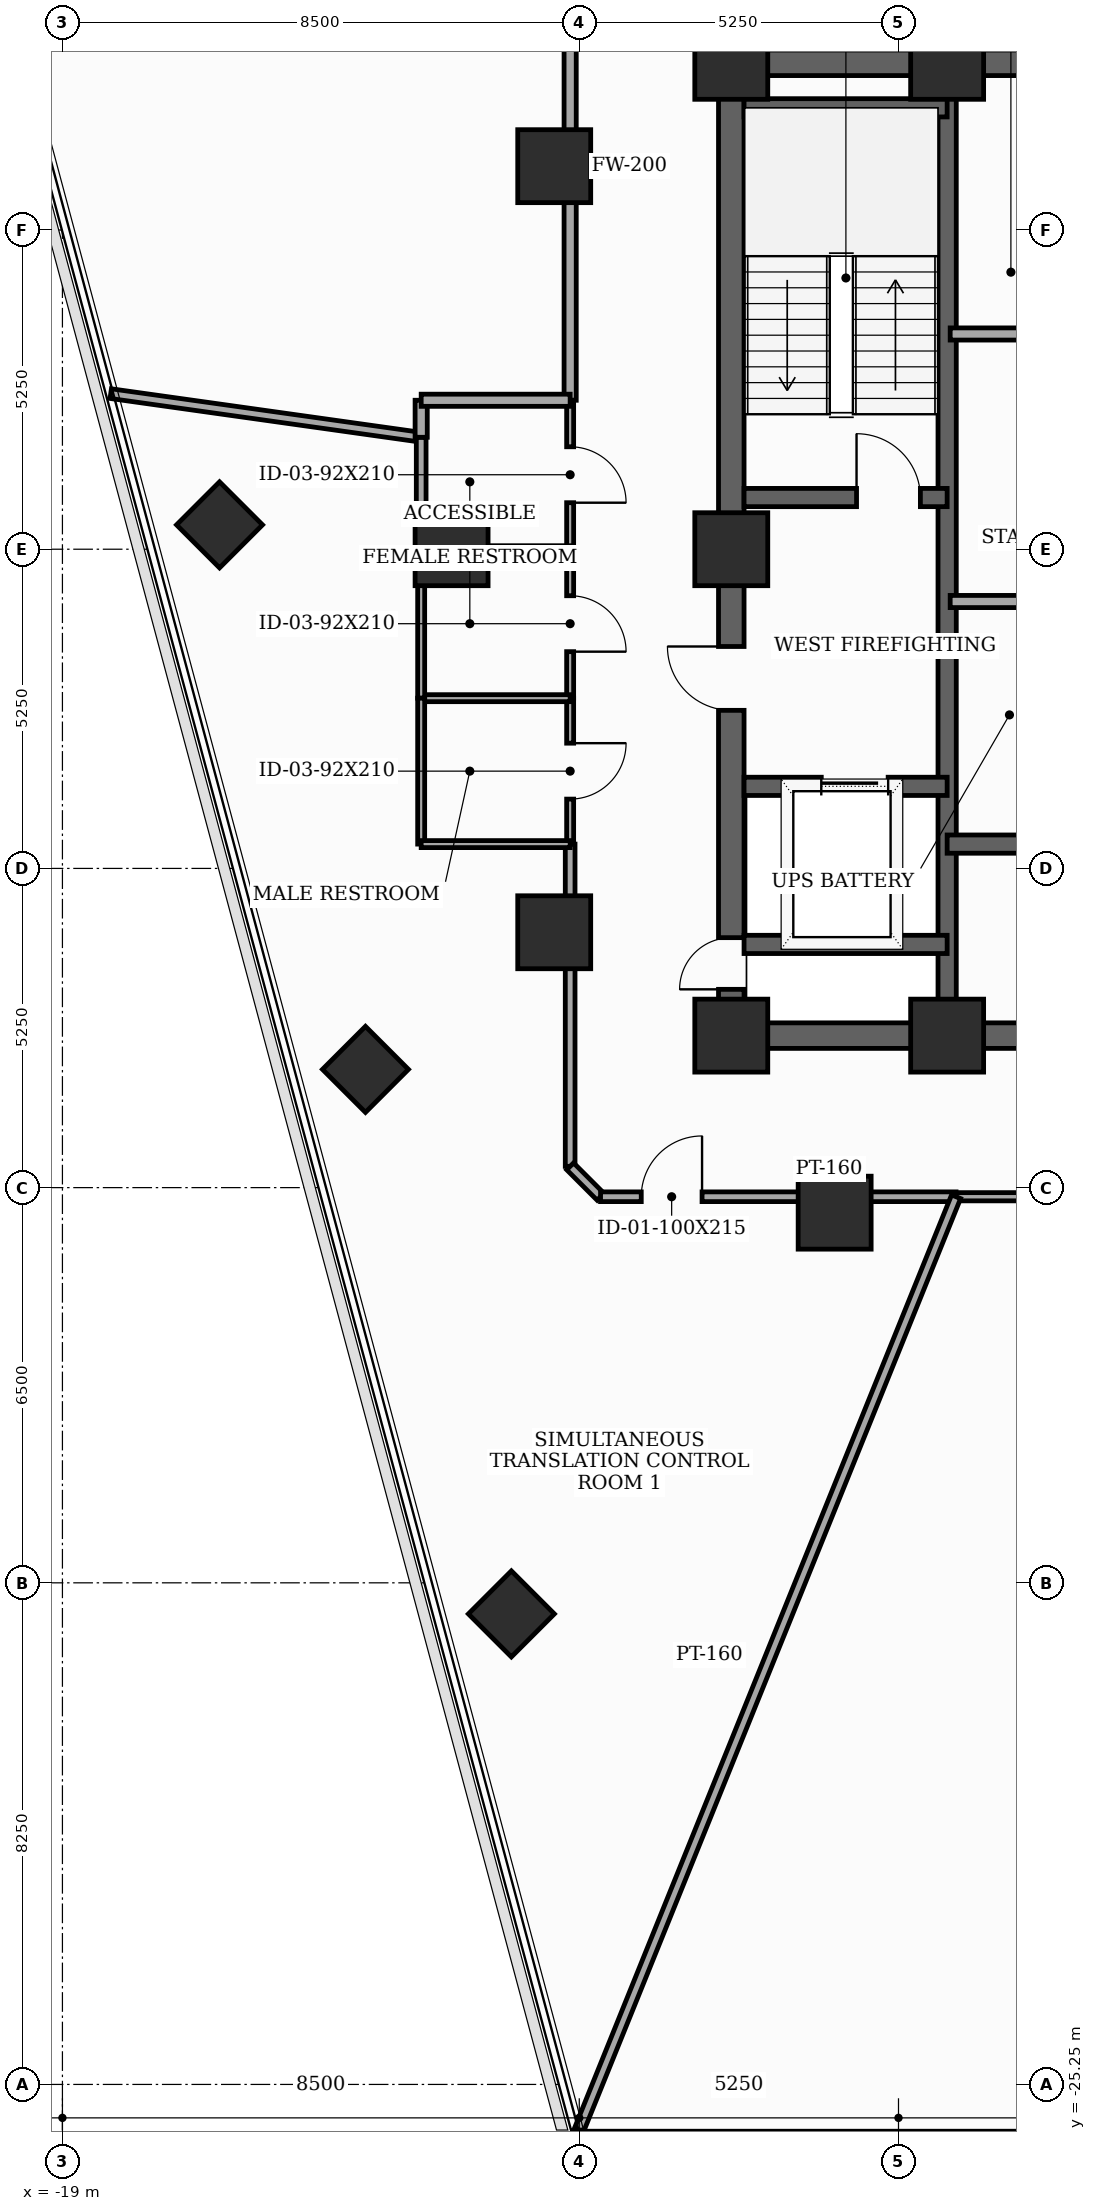
"""IFC4 building model, lengths in metres.
Left out: names, types, materials, properties, quantities, classifications, styles, units other than length and angle.
Written with IfcOpenShell. Run it as: python <this file> out.ifc"""

import sys

from ifc_helpers import new_model, si_unit, direction, frame, frame_2d, origin, origin_2d, place, context, subcontext, project, spatial, rectangle, extrude, element, fill, save


model = new_model("IFC4")
c1 = context("Model", 3, precision=1e-05, world=origin(), true_north=direction((0.0, 1.0)))
c2 = subcontext(c1, "Body", "Model", "MODEL_VIEW")
j1 = project(units=[si_unit("LENGTHUNIT", "METRE"), si_unit("PLANEANGLEUNIT", "RADIAN")], contexts=[c1])
p1 = place(None, origin())
s1 = spatial("IfcSite", under=j1, at=p1, CompositionType="ELEMENT")
p2 = place(p1, origin())
s2 = spatial("IfcBuilding", under=s1, at=p2, CompositionType="ELEMENT")
p3 = place(p2, frame((0.0, 0.0, 195.3)))
s3 = spatial("IfcBuildingStorey", under=s2, at=p3, CompositionType="ELEMENT", Elevation=195.3)
for number, where, z_axis, x_axis in (
    (1, (-8.0, -8.0, 0.0), (0.0, 0.0, 1.0), (1.0, 0.0, 0.0)),
    (2, (-4.45, -8.0, 0.0), (0.0, 0.0, 1.0), (1.0, 0.0, 0.0)),
    (3, (-4.45, 8.0, 0.0), (0.0, 0.0, 1.0), (1.0, 0.0, 0.0)),
    (4, (-8.0, 8.0, 0.0), (0.0, 0.0, 1.0), (1.0, 0.0, 0.0)),
    (5, (-8.0, 0.0, 0.0), (0.0, 0.0, 1.0), (1.0, 0.0, 0.0)),
    (6, (-10.912, 6.3, 0.0), (0.0, 0.0, 1.0), (1.0, 0.0, 0.0)),
    (7, (-12.6, 0.0, 0.0), (0.0, 0.0, 1.0), (1.0, 0.0, 0.0)),
    (8, (-10.912, -6.3, 0.0), (0.0, 0.0, 1.0), (1.0, 0.0, 0.0)),
    (9, (-6.3, -10.912, 0.0), (0.0, 0.0, 1.0), (1.0, 0.0, 0.0)),
):
    element("IfcColumn", number, at=place(p3, frame(where, z_axis=z_axis, x_axis=x_axis)), inside=s3, PredefinedType="COLUMN", context=c2, shape_type="SweptSolid", body=[
        extrude(rectangle(XDim=1.2, YDim=1.2, at=origin_2d()), origin(), (0.0, 0.0, 1.0), 3.7),
    ])
for number, where, z_axis, x_axis in (
    (10, (-16.416, 0.401, 0.0), (0.0, 0.0, 1.0), (0.707, 0.707, 0.0)),
    (11, (-14.016, -8.555, 0.0), (0.0, 0.0, 1.0), (0.707, 0.707, 0.0)),
    (12, (-11.616, -17.511, 0.0), (0.0, 0.0, 1.0), (0.707, 0.707, 0.0)),
):
    element("IfcColumn", number, at=place(p3, frame(where, z_axis=z_axis, x_axis=x_axis)), inside=s3, PredefinedType="COLUMN", context=c2, shape_type="SweptSolid", body=[
        extrude(rectangle(XDim=1.0, YDim=1.0, at=origin_2d()), origin(), (0.0, 0.0, 1.0), 3.7),
    ])
p4 = place(p3, frame((-8.0, -8.0, 0.0), z_axis=(0.0, 0.0, 1.0), x_axis=(0.0, 1.0, 0.0)))
e13 = element("IfcWall", 13, at=p4, inside=s3, PredefinedType="SHEAR", context=c2, shape_type="SweptSolid", body=[
    extrude(rectangle(XDim=16.0, YDim=0.42, at=frame_2d((8.0, 0.0))), origin(), (0.0, 0.0, 1.0), 3.5),
])
p5 = place(p4, frame((0.761, 0.0, 0.0)))
e14 = element("IfcOpeningElement", 14, at=p5, cuts=e13, PredefinedType="OPENING", context=c2, shape_type="SweptSolid", body=[
    extrude(rectangle(XDim=0.85, YDim=2.02, at=frame_2d((0.425, 1.01))), frame((0.0, 0.22, 0.0), z_axis=(0.0, -1.0, 0.0), x_axis=(1.0, 0.0, 0.0)), (0.0, 0.0, 1.0), 0.44),
])
p6 = place(p4, frame((5.35, 0.0, 0.0)))
e15 = element("IfcOpeningElement", 15, at=p6, cuts=e13, PredefinedType="OPENING", context=c2, shape_type="SweptSolid", body=[
    extrude(rectangle(XDim=1.05, YDim=2.15, at=frame_2d((0.525, 1.075))), frame((0.0, 0.22, 0.0), z_axis=(0.0, -1.0, 0.0), x_axis=(1.0, 0.0, 0.0)), (0.0, 0.0, 1.0), 0.44),
])
p7 = place(p3, frame((-8.0, -8.0, 0.0), z_axis=(0.0, 0.0, 1.0), x_axis=(1.0, 0.0, 0.0)))
e16 = element("IfcWall", 16, at=p7, inside=s3, PredefinedType="SHEAR", context=c2, shape_type="SweptSolid", body=[
    extrude(rectangle(XDim=16.0, YDim=0.42, at=frame_2d((8.0, 0.0))), origin(), (0.0, 0.0, 1.0), 3.5),
])
p8 = place(p7, frame((5.2, 0.0, 0.0)))
e17 = element("IfcOpeningElement", 17, at=p8, cuts=e16, PredefinedType="OPENING", context=c2, shape_type="SweptSolid", body=[
    extrude(rectangle(XDim=0.95, YDim=2.1, at=frame_2d((0.475, 1.05))), frame((0.0, 0.22, 0.0), z_axis=(0.0, -1.0, 0.0), x_axis=(1.0, 0.0, 0.0)), (0.0, 0.0, 1.0), 0.44),
])
p9 = place(p7, frame((9.8, 0.0, 0.0)))
e18 = element("IfcOpeningElement", 18, at=p9, cuts=e16, PredefinedType="OPENING", context=c2, shape_type="SweptSolid", body=[
    extrude(rectangle(XDim=0.95, YDim=2.1, at=frame_2d((0.475, 1.05))), frame((0.0, 0.22, 0.0), z_axis=(0.0, -1.0, 0.0), x_axis=(1.0, 0.0, 0.0)), (0.0, 0.0, 1.0), 0.44),
])
p10 = place(p3, frame((-8.0, 8.0, 0.0), z_axis=(0.0, 0.0, 1.0), x_axis=(1.0, 0.0, 0.0)))
e19 = element("IfcWall", 19, at=p10, inside=s3, PredefinedType="SHEAR", context=c2, shape_type="SweptSolid", body=[
    extrude(rectangle(XDim=16.0, YDim=0.42, at=frame_2d((8.0, 0.0))), origin(), (0.0, 0.0, 1.0), 3.5),
])
p11 = place(p10, frame((7.1, 0.0, 0.0)))
e20 = element("IfcOpeningElement", 20, at=p11, cuts=e19, PredefinedType="OPENING", context=c2, shape_type="SweptSolid", body=[
    extrude(rectangle(XDim=1.8, YDim=2.15, at=frame_2d((0.9, 1.075))), frame((0.0, 0.22, 0.0), z_axis=(0.0, -1.0, 0.0), x_axis=(1.0, 0.0, 0.0)), (0.0, 0.0, 1.0), 0.44),
])
p12 = place(p3, frame((-4.45, -7.79, 0.0), z_axis=(0.0, 0.0, 1.0), x_axis=(0.0, 1.0, 0.0)))
e21 = element("IfcWall", 21, at=p12, inside=s3, PredefinedType="SHEAR", context=c2, shape_type="SweptSolid", body=[
    extrude(rectangle(XDim=15.58, YDim=0.3, at=frame_2d((7.79, 0.0))), origin(), (0.0, 0.0, 1.0), 3.5),
])
p13 = place(p3, frame((-7.79, 0.85, 0.0), z_axis=(0.0, 0.0, 1.0), x_axis=(1.0, 0.0, 0.0)))
e22 = element("IfcWall", 22, at=p13, inside=s3, PredefinedType="SHEAR", context=c2, shape_type="SweptSolid", body=[
    extrude(rectangle(XDim=3.34, YDim=0.3, at=frame_2d((1.67, 0.0))), origin(), (0.0, 0.0, 1.0), 3.5),
])
p14 = place(p13, frame((1.85, 0.0, 0.0)))
e23 = element("IfcOpeningElement", 23, at=p14, cuts=e22, PredefinedType="OPENING", context=c2, shape_type="SweptSolid", body=[
    extrude(rectangle(XDim=1.05, YDim=2.15, at=frame_2d((0.525, 1.075))), frame((0.0, 0.16, 0.0), z_axis=(0.0, -1.0, 0.0), x_axis=(1.0, 0.0, 0.0)), (0.0, 0.0, 1.0), 0.32),
])
p15 = place(p3, frame((-7.79, 7.26, 0.0), z_axis=(0.0, 0.0, 1.0), x_axis=(1.0, 0.0, 0.0)))
e24 = element("IfcWall", 24, at=p15, inside=s3, PredefinedType="SHEAR", context=c2, shape_type="SweptSolid", body=[
    extrude(rectangle(XDim=3.34, YDim=0.3, at=frame_2d((1.67, 0.0))), origin(), (0.0, 0.0, 1.0), 3.5),
])
p16 = place(p3, frame((-7.79, -3.9, 0.0), z_axis=(0.0, 0.0, 1.0), x_axis=(1.0, 0.0, 0.0)))
e25 = element("IfcWall", 25, at=p16, inside=s3, PredefinedType="SHEAR", context=c2, shape_type="SweptSolid", body=[
    extrude(rectangle(XDim=3.34, YDim=0.3, at=frame_2d((1.67, 0.0))), origin(), (0.0, 0.0, 1.0), 3.5),
])
p17 = place(p16, frame((1.27, 0.0, 0.0)))
e26 = element("IfcOpeningElement", 26, at=p17, cuts=e25, PredefinedType="OPENING", context=c2, shape_type="SweptSolid", body=[
    extrude(rectangle(XDim=1.1, YDim=2.1, at=frame_2d((0.55, 1.05))), frame((0.0, 0.16, 0.0), z_axis=(0.0, -1.0, 0.0), x_axis=(1.0, 0.0, 0.0)), (0.0, 0.0, 1.0), 0.32),
])
p18 = place(p3, frame((-7.79, -6.5, 0.0), z_axis=(0.0, 0.0, 1.0), x_axis=(1.0, 0.0, 0.0)))
e27 = element("IfcWall", 27, at=p18, inside=s3, PredefinedType="SHEAR", context=c2, shape_type="SweptSolid", body=[
    extrude(rectangle(XDim=3.34, YDim=0.3, at=frame_2d((1.67, 0.0))), origin(), (0.0, 0.0, 1.0), 3.5),
])
p19 = place(p3, frame((-4.45, -4.85, 0.0), z_axis=(0.0, 0.0, 1.0), x_axis=(1.0, 0.0, 0.0)))
e28 = element("IfcWall", 28, at=p19, inside=s3, PredefinedType="SHEAR", context=c2, shape_type="SweptSolid", body=[
    extrude(rectangle(XDim=8.9, YDim=0.3, at=frame_2d((4.45, 0.0))), origin(), (0.0, 0.0, 1.0), 3.5),
])
for number, where, z_axis, x_axis in (
    (29, (-4.4, -0.86, 0.0), (0.0, 0.0, 1.0), (1.0, 0.0, 0.0)),
    (30, (-4.4, 3.54, 0.0), (0.0, 0.0, 1.0), (1.0, 0.0, 0.0)),
):
    element("IfcWall", number, at=place(p3, frame(where, z_axis=z_axis, x_axis=x_axis)), inside=s3, PredefinedType="SOLIDWALL", context=c2, shape_type="SweptSolid", body=[
        extrude(rectangle(XDim=2.68, YDim=0.2, at=frame_2d((1.34, 0.0))), origin(), (0.0, 0.0, 1.0), 3.5),
    ])
p20 = place(p3, frame((-10.65, 0.0, 0.0), z_axis=(0.0, 0.0, 1.0), x_axis=(0.0, -1.0, 0.0)))
e31 = element("IfcWall", 31, at=p20, inside=s3, PredefinedType="PARTITIONING", context=c2, shape_type="SweptSolid", body=[
    extrude(rectangle(XDim=2.45, YDim=0.115, at=frame_2d((1.225, 0.0))), origin(), (0.0, 0.0, 1.0), 2.885),
])
p21 = place(p20, frame((0.765, 0.0, 0.0)))
e32 = element("IfcOpeningElement", 32, at=p21, cuts=e31, PredefinedType="OPENING", context=c2, shape_type="SweptSolid", body=[
    extrude(rectangle(XDim=0.92, YDim=2.1, at=frame_2d((0.46, 1.05))), frame((0.0, 0.067, 0.0), z_axis=(0.0, -1.0, 0.0), x_axis=(1.0, 0.0, 0.0)), (0.0, 0.0, 1.0), 0.135),
])
p22 = place(p3, frame((-10.65, -2.45, 0.0), z_axis=(0.0, 0.0, 1.0), x_axis=(0.0, -1.0, 0.0)))
e33 = element("IfcWall", 33, at=p22, inside=s3, PredefinedType="PARTITIONING", context=c2, shape_type="SweptSolid", body=[
    extrude(rectangle(XDim=2.4, YDim=0.115, at=frame_2d((1.2, 0.0))), origin(), (0.0, 0.0, 1.0), 3.5),
])
p23 = place(p22, frame((0.74, 0.0, 0.0)))
e34 = element("IfcOpeningElement", 34, at=p23, cuts=e33, PredefinedType="OPENING", context=c2, shape_type="SweptSolid", body=[
    extrude(rectangle(XDim=0.92, YDim=2.1, at=frame_2d((0.46, 1.05))), frame((0.0, 0.067, 0.0), z_axis=(0.0, -1.0, 0.0), x_axis=(1.0, 0.0, 0.0)), (0.0, 0.0, 1.0), 0.135),
])
p24 = place(p3, frame((-10.65, -4.85, 0.0), z_axis=(0.0, 0.0, 1.0), x_axis=(0.0, -1.0, 0.0)))
e35 = element("IfcWall", 35, at=p24, inside=s3, PredefinedType="PARTITIONING", context=c2, shape_type="SweptSolid", body=[
    extrude(rectangle(XDim=5.3, YDim=0.16, at=frame_2d((2.65, 0.0))), origin(), (0.0, 0.0, 1.0), 2.885),
])
p25 = place(p3, frame((-10.65, -10.15, 0.0), z_axis=(0.0, 0.0, 1.0), x_axis=(0.707106781187, -0.707106781187, 0.0)))
e36 = element("IfcWall", 36, at=p25, inside=s3, PredefinedType="PARTITIONING", context=c2, shape_type="SweptSolid", body=[
    extrude(rectangle(XDim=0.707, YDim=0.16, at=frame_2d((0.354, 0.0))), origin(), (0.0, 0.0, 1.0), 3.5),
])
p26 = place(p3, frame((-10.15, -10.65, 0.0), z_axis=(0.0, 0.0, 1.0), x_axis=(1.0, 0.0, 0.0)))
e37 = element("IfcWall", 37, at=p26, inside=s3, PredefinedType="PARTITIONING", context=c2, shape_type="SweptSolid", body=[
    extrude(rectangle(XDim=5.847, YDim=0.16, at=frame_2d((2.923, 0.0))), origin(), (0.0, 0.0, 1.0), 2.885),
])
p27 = place(p26, frame((0.669, 0.0, 0.0)))
e38 = element("IfcOpeningElement", 38, at=p27, cuts=e37, PredefinedType="OPENING", context=c2, shape_type="SweptSolid", body=[
    extrude(rectangle(XDim=1.0, YDim=2.15, at=frame_2d((0.5, 1.075))), frame((0.0, 0.09, 0.0), z_axis=(0.0, -1.0, 0.0), x_axis=(1.0, 0.0, 0.0)), (0.0, 0.0, 1.0), 0.18),
])
p28 = place(p3, frame((-4.303, -10.65, 0.0), z_axis=(0.0, 0.0, 1.0), x_axis=(1.0, 0.0, 0.0)))
e39 = element("IfcWall", 39, at=p28, inside=s3, PredefinedType="PARTITIONING", context=c2, shape_type="SweptSolid", body=[
    extrude(rectangle(XDim=14.453, YDim=0.135, at=frame_2d((7.227, 0.0))), origin(), (0.0, 0.0, 1.0), 2.885),
])
p29 = place(p28, frame((6.751, 0.0, 0.0)))
e40 = element("IfcOpeningElement", 40, at=p29, cuts=e39, PredefinedType="OPENING", context=c2, shape_type="SweptSolid", body=[
    extrude(rectangle(XDim=0.95, YDim=2.1, at=frame_2d((0.475, 1.05))), frame((0.0, 0.077, 0.0), z_axis=(0.0, -1.0, 0.0), x_axis=(1.0, 0.0, 0.0)), (0.0, 0.0, 1.0), 0.155),
])
p30 = place(p3, frame((-10.65, 10.15, 0.0), z_axis=(0.0, 0.0, 1.0), x_axis=(0.0, -1.0, 0.0)))
e41 = element("IfcWall", 41, at=p30, inside=s3, PredefinedType="SOLIDWALL", context=c2, shape_type="SweptSolid", body=[
    extrude(rectangle(XDim=7.7, YDim=0.2, at=frame_2d((3.85, 0.0))), origin(), (0.0, 0.0, 1.0), 2.885),
])
p31 = place(p3, frame((-10.65, 2.45, 0.0), z_axis=(0.0, 0.0, 1.0), x_axis=(0.0, -1.0, 0.0)))
e42 = element("IfcWall", 42, at=p31, inside=s3, PredefinedType="PARTITIONING", context=c2, shape_type="SweptSolid", body=[
    extrude(rectangle(XDim=2.45, YDim=0.115, at=frame_2d((1.225, 0.0))), origin(), (0.0, 0.0, 1.0), 2.885),
])
p32 = place(p31, frame((0.765, 0.0, 0.0)))
e43 = element("IfcOpeningElement", 43, at=p32, cuts=e42, PredefinedType="OPENING", context=c2, shape_type="SweptSolid", body=[
    extrude(rectangle(XDim=0.92, YDim=2.1, at=frame_2d((0.46, 1.05))), frame((0.0, 0.067, 0.0), z_axis=(0.0, -1.0, 0.0), x_axis=(1.0, 0.0, 0.0)), (0.0, 0.0, 1.0), 0.135),
])
p33 = place(p3, frame((-13.1, -2.45, 0.0), z_axis=(0.0, 0.0, 1.0), x_axis=(1.0, 0.0, 0.0)))
e44 = element("IfcWall", 44, at=p33, inside=s3, PredefinedType="PARTITIONING", context=c2, shape_type="SweptSolid", body=[
    extrude(rectangle(XDim=2.45, YDim=0.115, at=frame_2d((1.225, 0.0))), origin(), (0.0, 0.0, 1.0), 2.885),
])
p34 = place(p3, frame((-13.1, 0.0, 0.0), z_axis=(0.0, 0.0, 1.0), x_axis=(0.0, -1.0, 0.0)))
e45 = element("IfcWall", 45, at=p34, inside=s3, PredefinedType="PARTITIONING", context=c2, shape_type="SweptSolid", body=[
    extrude(rectangle(XDim=2.45, YDim=0.115, at=frame_2d((1.225, 0.0))), origin(), (0.0, 0.0, 1.0), 2.985),
])
p35 = place(p3, frame((-10.65, 0.0, 0.0), z_axis=(0.0, 0.0, 1.0), x_axis=(-1.0, 0.0, 0.0)))
e46 = element("IfcWall", 46, at=p35, inside=s3, PredefinedType="PARTITIONING", context=c2, shape_type="SweptSolid", body=[
    extrude(rectangle(XDim=2.45, YDim=0.115, at=frame_2d((1.225, 0.0))), origin(), (0.0, 0.0, 1.0), 2.885),
])
p36 = place(p3, frame((-13.1, -2.45, 0.0), z_axis=(0.0, 0.0, 1.0), x_axis=(0.0, -1.0, 0.0)))
e47 = element("IfcWall", 47, at=p36, inside=s3, PredefinedType="PARTITIONING", context=c2, shape_type="SweptSolid", body=[
    extrude(rectangle(XDim=2.4, YDim=0.115, at=frame_2d((1.2, 0.0))), origin(), (0.0, 0.0, 1.0), 3.5),
])
p37 = place(p3, frame((-13.1, -4.85, 0.0), z_axis=(0.0, 0.0, 1.0), x_axis=(1.0, 0.0, 0.0)))
e48 = element("IfcWall", 48, at=p37, inside=s3, PredefinedType="PARTITIONING", context=c2, shape_type="SweptSolid", body=[
    extrude(rectangle(XDim=2.45, YDim=0.115, at=frame_2d((1.225, 0.0))), origin(), (0.0, 0.0, 1.0), 2.885),
])
p38 = place(p3, frame((-10.534, -26.073, 0.0), z_axis=(0.0, 0.0, 1.0), x_axis=(0.374584629334, 0.927192728329, 0.0)))
e49 = element("IfcWall", 49, at=p38, inside=s3, PredefinedType="PARTITIONING", context=c2, shape_type="SweptSolid", body=[
    extrude(rectangle(XDim=16.634, YDim=0.16, at=frame_2d((8.317, 0.0))), origin(), (0.0, 0.0, 1.0), 2.885),
])
p39 = place(p3, frame((-13.1, 1.841, 0.0), z_axis=(0.0, 0.0, 1.0), x_axis=(-0.990254946284, 0.139266440179, 0.0)))
e50 = element("IfcWall", 50, at=p39, inside=s3, PredefinedType="PARTITIONING", context=c2, shape_type="SweptSolid", body=[
    extrude(rectangle(XDim=5.156, YDim=0.16, at=frame_2d((2.578, 0.0))), origin(), (0.0, 0.0, 1.0), 2.985),
])
p40 = place(p3, frame((-13.1, 0.0, 0.0), z_axis=(0.0, 0.0, 1.0), x_axis=(0.0, 1.0, 0.0)))
e51 = element("IfcWall", 51, at=p40, inside=s3, PredefinedType="PARTITIONING", context=c2, shape_type="SweptSolid", body=[
    extrude(rectangle(XDim=1.841, YDim=0.16, at=frame_2d((0.92, 0.0))), origin(), (0.0, 0.0, 1.0), 2.985),
])
p41 = place(p3, frame((-13.1, 1.841, 0.0), z_axis=(0.0, 0.0, 1.0), x_axis=(0.0, 1.0, 0.0)))
e52 = element("IfcWall", 52, at=p41, inside=s3, PredefinedType="SOLIDWALL", context=c2, shape_type="SweptSolid", body=[
    extrude(rectangle(XDim=0.609, YDim=0.2, at=frame_2d((0.304, 0.0))), origin(), (0.0, 0.0, 1.0), 3.5),
])
p42 = place(p3, frame((-13.1, 2.45, 0.0), z_axis=(0.0, 0.0, 1.0), x_axis=(1.0, 0.0, 0.0)))
e53 = element("IfcWall", 53, at=p42, inside=s3, PredefinedType="SOLIDWALL", context=c2, shape_type="SweptSolid", body=[
    extrude(rectangle(XDim=2.45, YDim=0.2, at=frame_2d((1.225, 0.0))), origin(), (0.0, 0.0, 1.0), 2.885),
])
p43 = place(p5, origin())
e54 = element("IfcDoor", 54, at=p43, inside=s3, OperationType="SINGLE_SWING_LEFT", PredefinedType="TRAPDOOR", context=c2, shape_type="SweptSolid", body=[
    extrude(rectangle(XDim=0.85, YDim=2.02, at=frame_2d((0.425, 1.01))), frame((0.0, 0.025, 0.0), z_axis=(0.0, -1.0, 0.0), x_axis=(1.0, 0.0, 0.0)), (0.0, 0.0, 1.0), 0.05),
])
fill(e14, e54)
p44 = place(p6, origin())
e55 = element("IfcDoor", 55, at=p44, inside=s3, OperationType="SINGLE_SWING_RIGHT", PredefinedType="DOOR", context=c2, shape_type="SweptSolid", body=[
    extrude(rectangle(XDim=1.05, YDim=2.15, at=frame_2d((0.525, 1.075))), frame((0.0, 0.025, 0.0), z_axis=(0.0, -1.0, 0.0), x_axis=(1.0, 0.0, 0.0)), (0.0, 0.0, 1.0), 0.05),
])
fill(e15, e55)
p45 = place(p14, origin())
e56 = element("IfcDoor", 56, at=p45, inside=s3, OperationType="SINGLE_SWING_LEFT", PredefinedType="DOOR", context=c2, shape_type="SweptSolid", body=[
    extrude(rectangle(XDim=1.05, YDim=2.15, at=frame_2d((0.525, 1.075))), frame((0.0, 0.025, 0.0), z_axis=(0.0, -1.0, 0.0), x_axis=(1.0, 0.0, 0.0)), (0.0, 0.0, 1.0), 0.05),
])
fill(e23, e56)
p46 = place(p17, origin())
e57 = element("IfcDoor", 57, at=p46, inside=s3, OperationType="SLIDING_TO_LEFT", PredefinedType="DOOR", context=c2, shape_type="SweptSolid", body=[
    extrude(rectangle(XDim=1.1, YDim=2.1, at=frame_2d((0.55, 1.05))), frame((0.0, 0.025, 0.0), z_axis=(0.0, -1.0, 0.0), x_axis=(1.0, 0.0, 0.0)), (0.0, 0.0, 1.0), 0.05),
])
fill(e26, e57)
p47 = place(p21, origin())
e58 = element("IfcDoor", 58, at=p47, inside=s3, OperationType="SINGLE_SWING_RIGHT", PredefinedType="DOOR", context=c2, shape_type="SweptSolid", body=[
    extrude(rectangle(XDim=0.92, YDim=2.1, at=frame_2d((0.46, 1.05))), frame((0.0, 0.025, 0.0), z_axis=(0.0, -1.0, 0.0), x_axis=(1.0, 0.0, 0.0)), (0.0, 0.0, 1.0), 0.05),
])
fill(e32, e58)
p48 = place(p23, origin())
e59 = element("IfcDoor", 59, at=p48, inside=s3, OperationType="SINGLE_SWING_LEFT", PredefinedType="DOOR", context=c2, shape_type="SweptSolid", body=[
    extrude(rectangle(XDim=0.92, YDim=2.1, at=frame_2d((0.46, 1.05))), frame((0.0, 0.025, 0.0), z_axis=(0.0, -1.0, 0.0), x_axis=(1.0, 0.0, 0.0)), (0.0, 0.0, 1.0), 0.05),
])
fill(e34, e59)
p49 = place(p27, origin())
e60 = element("IfcDoor", 60, at=p49, inside=s3, OperationType="SINGLE_SWING_RIGHT", PredefinedType="DOOR", context=c2, shape_type="SweptSolid", body=[
    extrude(rectangle(XDim=1.0, YDim=2.15, at=frame_2d((0.5, 1.075))), frame((0.0, 0.025, 0.0), z_axis=(0.0, -1.0, 0.0), x_axis=(1.0, 0.0, 0.0)), (0.0, 0.0, 1.0), 0.05),
])
fill(e38, e60)
p50 = place(p32, origin())
e61 = element("IfcDoor", 61, at=p50, inside=s3, OperationType="SINGLE_SWING_RIGHT", PredefinedType="DOOR", context=c2, shape_type="SweptSolid", body=[
    extrude(rectangle(XDim=0.92, YDim=2.1, at=frame_2d((0.46, 1.05))), frame((0.0, 0.025, 0.0), z_axis=(0.0, -1.0, 0.0), x_axis=(1.0, 0.0, 0.0)), (0.0, 0.0, 1.0), 0.05),
])
fill(e43, e61)
save(model, sys.argv[1])
